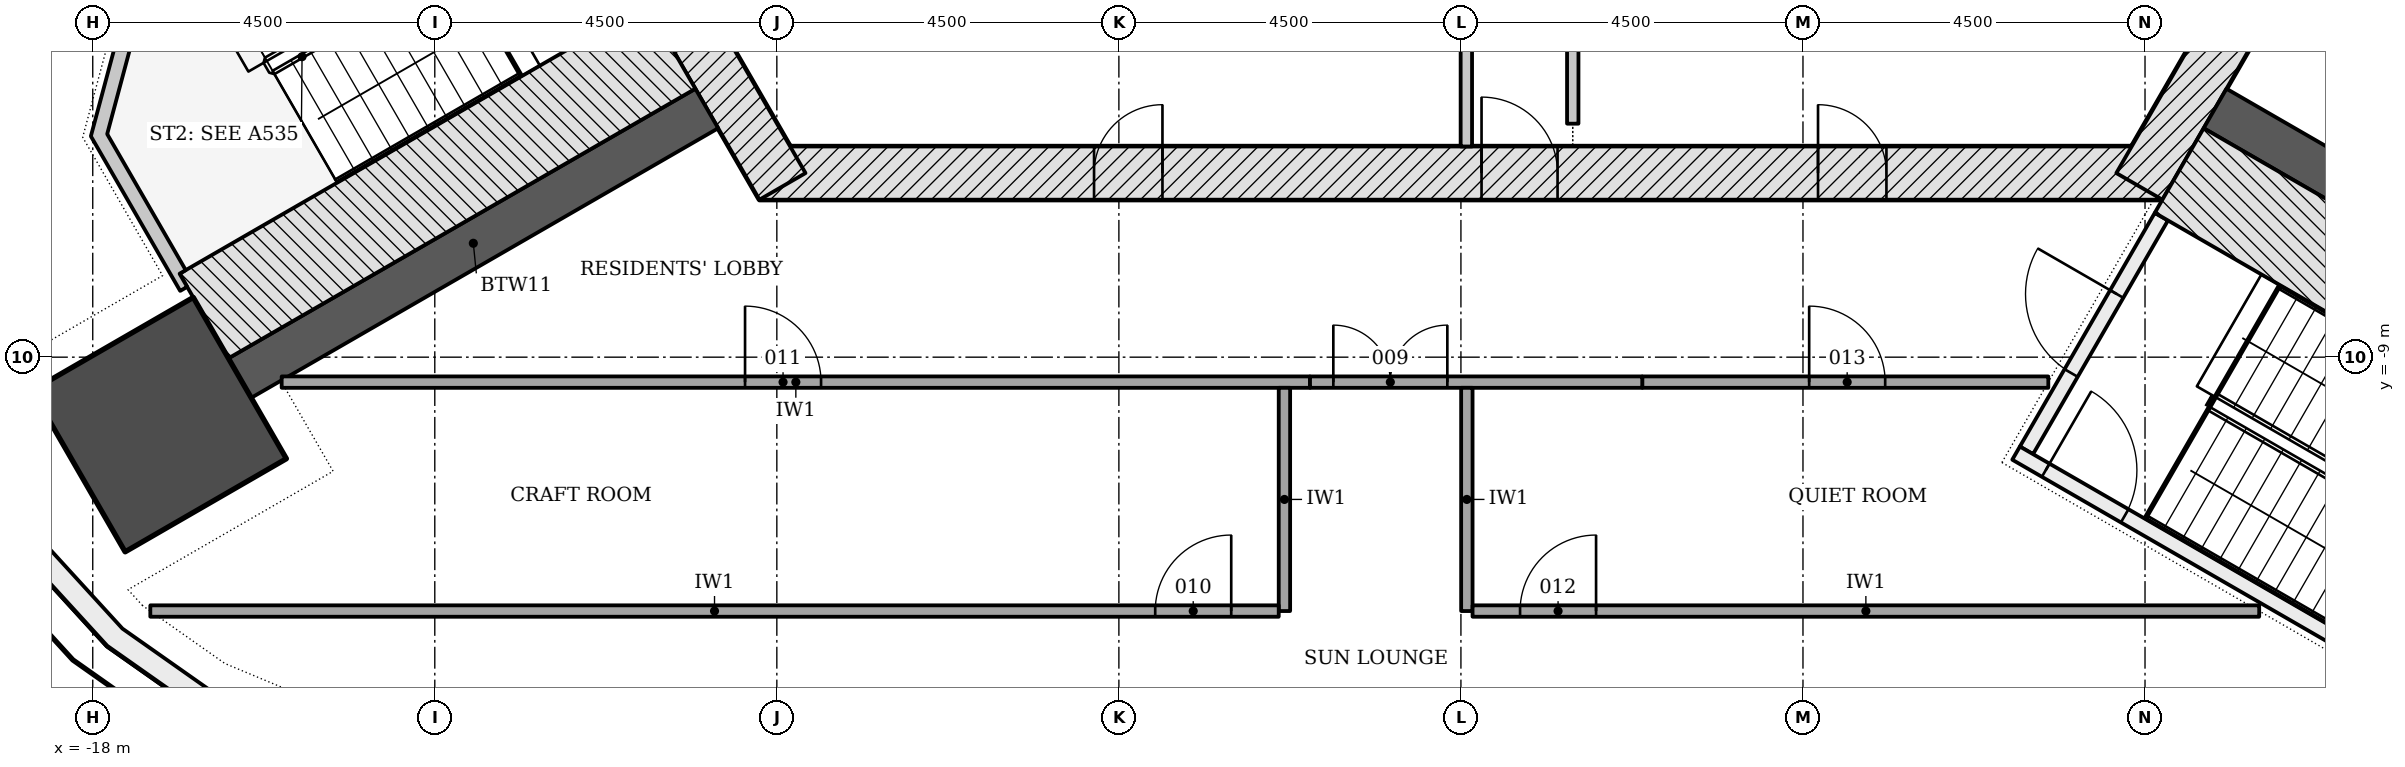
"""IFC4 building model, lengths in metres.
Left out: names, types, materials, properties, quantities, classifications, styles, units other than length and angle.
Written with IfcOpenShell. Run it as: python <this file> out.ifc"""

import sys

from ifc_helpers import new_model, si_unit, direction, frame, frame_2d, origin, origin_2d, place, context, subcontext, project, spatial, polyline, rectangle, outline, extrude, element, fill, save


model = new_model("IFC4")
c1 = context("Model", 3, precision=1e-05, world=origin(), true_north=direction((0.0, 1.0)))
c2 = subcontext(c1, "Body", "Model", "MODEL_VIEW")
j1 = project(units=[si_unit("LENGTHUNIT", "METRE"), si_unit("PLANEANGLEUNIT", "RADIAN")], contexts=[c1])
p1 = place(None, origin())
s1 = spatial("IfcSite", under=j1, at=p1, CompositionType="ELEMENT")
p2 = place(p1, origin())
s2 = spatial("IfcBuilding", under=s1, at=p2, CompositionType="ELEMENT")
p3 = place(p2, frame((0.0, 0.0, 240.0)))
s3 = spatial("IfcBuildingStorey", under=s2, at=p3, CompositionType="ELEMENT", Elevation=240.0)
p4 = place(p3, frame((-9.229, -6.578, -0.2), z_axis=(0.0, 0.0, 1.0), x_axis=(1.0, 0.0, 0.0)))
e1 = element("IfcWall", 1, at=p4, inside=s3, PredefinedType="SHEAR", context=c2, shape_type="SweptSolid", body=[
    extrude(rectangle(XDim=18.458, YDim=0.7, at=frame_2d((9.229, 0.0))), origin(), (0.0, 0.0, 1.0), 3.6),
])
p5 = place(p4, frame((9.5, 0.0, 0.2)))
e2 = element("IfcOpeningElement", 2, at=p5, cuts=e1, PredefinedType="OPENING", context=c2, shape_type="SweptSolid", body=[
    extrude(rectangle(XDim=1.0, YDim=2.1, at=frame_2d((0.5, 1.05))), frame((0.0, 0.36, 0.0), z_axis=(0.0, -1.0, 0.0), x_axis=(1.0, 0.0, 0.0)), (0.0, 0.0, 1.0), 0.72),
])
p6 = place(p4, frame((4.402, 0.0, 0.2)))
e3 = element("IfcOpeningElement", 3, at=p6, cuts=e1, PredefinedType="OPENING", context=c2, shape_type="SweptSolid", body=[
    extrude(rectangle(XDim=0.9, YDim=2.1, at=frame_2d((0.45, 1.05))), frame((0.0, 0.36, 0.0), z_axis=(0.0, -1.0, 0.0), x_axis=(1.0, 0.0, 0.0)), (0.0, 0.0, 1.0), 0.72),
])
p7 = place(p4, frame((13.927, 0.0, 0.2)))
e4 = element("IfcOpeningElement", 4, at=p7, cuts=e1, PredefinedType="OPENING", context=c2, shape_type="SweptSolid", body=[
    extrude(rectangle(XDim=0.9, YDim=2.1, at=frame_2d((0.45, 1.05))), frame((0.0, 0.36, 0.0), z_axis=(0.0, -1.0, 0.0), x_axis=(1.0, 0.0, 0.0)), (0.0, 0.0, 1.0), 0.72),
])
for number, where, z_axis, x_axis in (
    (5, (8.926, -6.753, -0.2), (0.0, 0.0, 1.0), (0.5, 0.866, 0.0)),
    (6, (-10.311, -4.353, -0.2), (0.0, 0.0, 1.0), (0.5, -0.866, 0.0)),
):
    element("IfcWall", number, at=place(p3, frame(where, z_axis=z_axis, x_axis=x_axis)), inside=s3, PredefinedType="SHEAR", context=c2, shape_type="SweptSolid", body=[
        extrude(rectangle(XDim=2.771, YDim=0.7, at=frame_2d((1.386, 0.0))), origin(), (0.0, 0.0, 1.0), 3.6),
    ])
for number, where, z_axis, x_axis in (
    (7, (-9.922, -5.728, -0.2), (0.0, 0.0, 1.0), (-0.866, -0.5, 0.0)),
    (8, (9.922, -5.728, -0.2), (0.0, 0.0, 1.0), (0.866, -0.5, 0.0)),
):
    element("IfcWall", number, at=place(p3, frame(where, z_axis=z_axis, x_axis=x_axis)), inside=s3, PredefinedType="SHEAR", context=c2, shape_type="SweptSolid", body=[
        extrude(rectangle(XDim=7.093, YDim=0.6, at=frame_2d((3.547, 0.0))), origin(), (0.0, 0.0, 1.0), 3.6),
    ])
p8 = place(p3, frame((-17.126, -9.887, -0.2), z_axis=(0.0, 0.0, 1.0), x_axis=(-0.866025403784, -0.5, 0.0)))
e9 = element("IfcColumn", 9, at=p8, inside=s3, PredefinedType="COLUMN", context=c2, shape_type="SweptSolid", body=[
    extrude(rectangle(XDim=2.45, YDim=2.45, at=origin_2d()), origin(), (0.0, 0.0, 1.0), 3.6),
])
p9 = place(p3, origin())
e10 = element("IfcWall", 10, at=p9, inside=s3, PredefinedType="NOTDEFINED", context=c2, shape_type="SweptSolid", body=[
    extrude(outline(polyline([(-18.301, -2.417), (-19.433, -4.702), (-19.931, -6.091), (-20.119, -7.555), (-19.987, -9.024), (-19.542, -10.431), (-18.804, -11.708), (-17.809, -12.798), (-16.602, -13.646), (-15.241, -14.215), (-13.789, -14.478), (-11.244, -14.641), (-11.225, -14.341), (-13.752, -14.18), (-15.155, -13.926), (-16.456, -13.382), (-17.609, -12.571), (-18.561, -11.53), (-19.266, -10.309), (-19.691, -8.965), (-19.817, -7.56), (-19.638, -6.162), (-19.156, -4.82), (-18.032, -2.55), (-18.301, -2.417)])), origin(), (0.0, 0.0, 1.0), 3.3),
])
p10 = place(p3, origin())
e11 = element("IfcWall", 11, at=p10, inside=s3, PredefinedType="NOTDEFINED", context=c2, shape_type="SweptSolid", body=[
    extrude(outline(polyline([(11.244, -14.641), (13.789, -14.478), (15.241, -14.215), (16.602, -13.646), (17.809, -12.798), (18.804, -11.708), (19.542, -10.431), (19.987, -9.024), (20.119, -7.555), (19.931, -6.091), (19.433, -4.702), (18.301, -2.417), (18.032, -2.55), (19.156, -4.82), (19.638, -6.162), (19.817, -7.56), (19.691, -8.965), (19.266, -10.309), (18.561, -11.53), (17.609, -12.571), (16.456, -13.382), (15.155, -13.926), (13.752, -14.18), (11.225, -14.341), (11.244, -14.641)])), origin(), (0.0, 0.0, 1.0), 3.3),
])
p11 = place(p3, frame((0.071, 4.272, 0.0), z_axis=(0.0, 0.0, 1.0), x_axis=(0.0, -1.0, 0.0)))
e12 = element("IfcWall", 12, at=p11, inside=s3, PredefinedType="PARTITIONING", context=c2, shape_type="SweptSolid", body=[
    extrude(rectangle(XDim=10.5, YDim=0.15, at=frame_2d((5.25, 0.0))), origin(), (0.0, 0.0, 1.0), 3.4),
])
p12 = place(p11, frame((3.101, 0.0, 0.0)))
e13 = element("IfcOpeningElement", 13, at=p12, cuts=e12, PredefinedType="OPENING", context=c2, shape_type="SweptSolid", body=[
    extrude(rectangle(XDim=0.9, YDim=2.1, at=frame_2d((0.45, 1.05))), frame((0.0, 0.085, 0.0), z_axis=(0.0, -1.0, 0.0), x_axis=(1.0, 0.0, 0.0)), (0.0, 0.0, 1.0), 0.17),
])
p13 = place(p3, frame((1.471, -5.928, 0.0), z_axis=(0.0, 0.0, 1.0), x_axis=(0.0, 1.0, 0.0)))
e14 = element("IfcWall", 14, at=p13, inside=s3, PredefinedType="PARTITIONING", context=c2, shape_type="SweptSolid", body=[
    extrude(rectangle(XDim=10.206, YDim=0.15, at=frame_2d((5.103, 0.0))), origin(), (0.0, 0.0, 1.0), 3.4),
])
p14 = place(p13, frame((6.15, 0.0, 0.0)))
e15 = element("IfcOpeningElement", 15, at=p14, cuts=e14, PredefinedType="OPENING", context=c2, shape_type="SweptSolid", body=[
    extrude(rectangle(XDim=1.0, YDim=2.1, at=frame_2d((0.5, 1.05))), frame((0.0, 0.085, 0.0), z_axis=(0.0, -1.0, 0.0), x_axis=(1.0, 0.0, 0.0)), (0.0, 0.0, 1.0), 0.17),
])
p15 = place(p3, frame((-10.393, -4.912, -0.2), z_axis=(0.0, 0.0, 1.0), x_axis=(-0.866023389271, -0.500003489223, 0.0)))
e16 = element("IfcWall", 16, at=p15, inside=s3, PredefinedType="SHEAR", context=c2, shape_type="SweptSolid", body=[
    extrude(rectangle(XDim=7.094, YDim=1.286, at=frame_2d((3.547, 0.0))), origin(), (0.0, 0.0, 1.0), 3.6),
])
p16 = place(p3, frame((0.0, 0.0, -0.2)))
e17 = element("IfcWall", 17, at=p16, inside=s3, PredefinedType="SHEAR", context=c2, shape_type="SweptSolid", body=[
    extrude(outline(polyline([(-17.439, -3.907), (-18.025, -6.093), (-16.85, -8.128), (-16.758, -8.075), (-16.858, -7.902), (-16.858, -7.902), (-16.858, -7.902), (-16.858, -7.902), (-16.858, -7.902), (-16.858, -7.902), (-16.858, -7.902), (-16.858, -7.902), (-16.858, -7.902), (-16.858, -7.902), (-16.858, -7.902), (-16.858, -7.902), (-16.858, -7.902), (-16.858, -7.902), (-16.858, -7.902), (-16.858, -7.902), (-16.858, -7.902), (-16.777, -7.855), (-17.81, -6.065), (-17.267, -4.039), (-17.339, -4.081), (-17.339, -4.081), (-17.339, -4.081), (-17.339, -4.081), (-17.339, -4.081), (-17.339, -4.081), (-17.339, -4.081), (-17.339, -4.081), (-17.339, -4.081), (-17.339, -4.081), (-17.339, -4.081), (-17.339, -4.081), (-17.339, -4.081), (-17.339, -4.081), (-17.339, -4.081), (-17.339, -4.081), (-17.339, -4.081), (-17.439, -3.907)])), origin(), (0.0, 0.0, 1.0), 3.6),
])
p17 = place(p3, frame((7.44, -10.226, -0.2), z_axis=(0.0, 0.0, 1.0), x_axis=(0.500022077904, 0.866012656725, 0.0)))
e18 = element("IfcWall", 18, at=p17, inside=s3, PredefinedType="SHEAR", context=c2, shape_type="SweptSolid", body=[
    extrude(rectangle(XDim=3.55, YDim=0.2, at=frame_2d((1.775, 0.0))), origin(), (0.0, 0.0, 1.0), 3.6),
])
p18 = place(p17, frame((1.175, 0.0, 0.2)))
e19 = element("IfcOpeningElement", 19, at=p18, cuts=e18, PredefinedType="OPENING", context=c2, shape_type="SweptSolid", body=[
    extrude(rectangle(XDim=1.2, YDim=2.1, at=frame_2d((0.6, 1.05))), frame((0.0, 0.11, 0.0), z_axis=(0.0, -1.0, 0.0), x_axis=(1.0, 0.0, 0.0)), (0.0, 0.0, 1.0), 0.22),
])
p19 = place(p3, frame((7.304, -10.262, -0.2), z_axis=(0.0, 0.0, 1.0), x_axis=(0.866026594901, -0.49999793692, 0.0)))
e20 = element("IfcWall", 20, at=p19, inside=s3, PredefinedType="SHEAR", context=c2, shape_type="SweptSolid", body=[
    extrude(rectangle(XDim=5.6, YDim=0.2, at=frame_2d((2.8, 0.0))), origin(), (0.0, 0.0, 1.0), 3.6),
])
p20 = place(p19, frame((0.45, 0.0, 0.2)))
e21 = element("IfcOpeningElement", 21, at=p20, cuts=e20, PredefinedType="OPENING", context=c2, shape_type="SweptSolid", body=[
    extrude(rectangle(XDim=1.2, YDim=2.1, at=frame_2d((0.6, 1.05))), frame((0.0, 0.11, 0.0), z_axis=(0.0, -1.0, 0.0), x_axis=(1.0, 0.0, 0.0)), (0.0, 0.0, 1.0), 0.22),
])
p21 = place(p3, frame((9.45, -6.545, -0.2), z_axis=(0.0, 0.0, 1.0), x_axis=(0.866023389271, -0.500003489223, 0.0)))
e22 = element("IfcWall", 22, at=p21, inside=s3, PredefinedType="SHEAR", context=c2, shape_type="SweptSolid", body=[
    extrude(rectangle(XDim=7.094, YDim=1.286, at=frame_2d((3.547, 0.0))), origin(), (0.0, 0.0, 1.0), 3.6),
])
p22 = place(p3, frame((15.836, -8.772, 0.0), z_axis=(0.0, 0.0, 1.0), x_axis=(-0.500001479768, 0.866024549438, 0.0)))
e23 = element("IfcWall", 23, at=p22, inside=s3, PredefinedType="PARTITIONING", context=c2, shape_type="SweptSolid", body=[
    extrude(rectangle(XDim=17.9, YDim=0.15, at=frame_2d((8.95, 0.0))), origin(), (0.0, 0.0, 1.0), 2.852),
])
p23 = place(p22, frame((2.973, 0.0, 0.0)))
e24 = element("IfcOpeningElement", 24, at=p23, cuts=e23, PredefinedType="OPENING", context=c2, shape_type="SweptSolid", body=[
    extrude(rectangle(XDim=1.0, YDim=2.1, at=frame_2d((0.5, 1.05))), frame((0.0, 0.085, 0.0), z_axis=(0.0, -1.0, 0.0), x_axis=(1.0, 0.0, 0.0)), (0.0, 0.0, 1.0), 0.17),
])
p24 = place(p22, frame((11.837, 0.0, 0.0)))
e25 = element("IfcOpeningElement", 25, at=p24, cuts=e23, PredefinedType="OPENING", context=c2, shape_type="SweptSolid", body=[
    extrude(rectangle(XDim=1.0, YDim=2.1, at=frame_2d((0.5, 1.05))), frame((0.0, 0.085, 0.0), z_axis=(0.0, -1.0, 0.0), x_axis=(1.0, 0.0, 0.0)), (0.0, 0.0, 1.0), 0.17),
])
p25 = place(p3, frame((-15.514, -9.328, 0.0), z_axis=(0.0, 0.0, 1.0), x_axis=(1.0, 0.0, 0.0)))
e26 = element("IfcWall", 26, at=p25, inside=s3, PredefinedType="PARTITIONING", context=c2, shape_type="SweptSolid", body=[
    extrude(rectangle(XDim=13.529, YDim=0.15, at=frame_2d((6.764, 0.0))), origin(), (0.0, 0.0, 1.0), 2.852),
])
p26 = place(p25, frame((6.096, 0.0, 0.0)))
e27 = element("IfcOpeningElement", 27, at=p26, cuts=e26, PredefinedType="OPENING", context=c2, shape_type="SweptSolid", body=[
    extrude(rectangle(XDim=1.0, YDim=2.1, at=frame_2d((0.5, 1.05))), frame((0.0, 0.085, 0.0), z_axis=(0.0, -1.0, 0.0), x_axis=(1.0, 0.0, 0.0)), (0.0, 0.0, 1.0), 0.17),
])
p27 = place(p3, frame((2.385, -9.328, 0.0), z_axis=(0.0, 0.0, 1.0), x_axis=(1.0, 0.0, 0.0)))
e28 = element("IfcWall", 28, at=p27, inside=s3, PredefinedType="PARTITIONING", context=c2, shape_type="SweptSolid", body=[
    extrude(rectangle(XDim=5.342, YDim=0.15, at=frame_2d((2.671, 0.0))), origin(), (0.0, 0.0, 1.0), 2.852),
])
p28 = place(p27, frame((2.196, 0.0, 0.0)))
e29 = element("IfcOpeningElement", 29, at=p28, cuts=e28, PredefinedType="OPENING", context=c2, shape_type="SweptSolid", body=[
    extrude(rectangle(XDim=1.0, YDim=2.1, at=frame_2d((0.5, 1.05))), frame((0.0, 0.085, 0.0), z_axis=(0.0, -1.0, 0.0), x_axis=(1.0, 0.0, 0.0)), (0.0, 0.0, 1.0), 0.17),
])
p29 = place(p3, frame((-1.986, -9.328, 0.0), z_axis=(0.0, 0.0, 1.0), x_axis=(1.0, 0.0, 0.0)))
e30 = element("IfcWall", 30, at=p29, inside=s3, PredefinedType="PARTITIONING", context=c2, shape_type="SweptSolid", body=[
    extrude(rectangle(XDim=4.371, YDim=0.15, at=frame_2d((2.186, 0.0))), origin(), (0.0, 0.0, 1.0), 2.852),
])
p30 = place(p29, frame((0.307, 0.0, 0.0)))
e31 = element("IfcOpeningElement", 31, at=p30, cuts=e30, PredefinedType="OPENING", context=c2, shape_type="SweptSolid", body=[
    extrude(rectangle(XDim=1.5, YDim=2.1, at=frame_2d((0.75, 1.05))), frame((0.0, 0.085, 0.0), z_axis=(0.0, -1.0, 0.0), x_axis=(1.0, 0.0, 0.0)), (0.0, 0.0, 1.0), 0.17),
])
p31 = place(p3, frame((-2.322, -9.403, 0.0), z_axis=(0.0, 0.0, 1.0), x_axis=(0.0, -1.0, 0.0)))
e32 = element("IfcWall", 32, at=p31, inside=s3, PredefinedType="PARTITIONING", context=c2, shape_type="SweptSolid", body=[
    extrude(rectangle(XDim=2.937, YDim=0.15, at=frame_2d((1.468, 0.0))), origin(), (0.0, 0.0, 1.0), 2.852),
])
p32 = place(p3, frame((0.078, -9.403, 0.0), z_axis=(0.0, 0.0, 1.0), x_axis=(0.0, -1.0, 0.0)))
e33 = element("IfcWall", 33, at=p32, inside=s3, PredefinedType="PARTITIONING", context=c2, shape_type="SweptSolid", body=[
    extrude(rectangle(XDim=2.937, YDim=0.15, at=frame_2d((1.468, 0.0))), origin(), (0.0, 0.0, 1.0), 3.4),
])
p33 = place(p3, frame((-17.243, -12.34, 0.0), z_axis=(0.0, 0.0, 1.0), x_axis=(1.0, 0.0, 0.0)))
e34 = element("IfcWall", 34, at=p33, inside=s3, PredefinedType="PARTITIONING", context=c2, shape_type="SweptSolid", body=[
    extrude(rectangle(XDim=14.846, YDim=0.15, at=frame_2d((7.423, 0.0))), origin(), (0.0, 0.0, 1.0), 2.852),
])
p34 = place(p33, frame((13.221, 0.0, 0.0)))
e35 = element("IfcOpeningElement", 35, at=p34, cuts=e34, PredefinedType="OPENING", context=c2, shape_type="SweptSolid", body=[
    extrude(rectangle(XDim=1.0, YDim=2.1, at=frame_2d((0.5, 1.05))), frame((0.0, 0.085, 0.0), z_axis=(0.0, -1.0, 0.0), x_axis=(1.0, 0.0, 0.0)), (0.0, 0.0, 1.0), 0.17),
])
p35 = place(p3, frame((0.153, -12.34, 0.0), z_axis=(0.0, 0.0, 1.0), x_axis=(1.0, 0.0, 0.0)))
e36 = element("IfcWall", 36, at=p35, inside=s3, PredefinedType="PARTITIONING", context=c2, shape_type="SweptSolid", body=[
    extrude(rectangle(XDim=10.349, YDim=0.15, at=frame_2d((5.175, 0.0))), origin(), (0.0, 0.0, 1.0), 2.852),
])
p36 = place(p35, frame((0.625, 0.0, 0.0)))
e37 = element("IfcOpeningElement", 37, at=p36, cuts=e36, PredefinedType="OPENING", context=c2, shape_type="SweptSolid", body=[
    extrude(rectangle(XDim=1.0, YDim=2.1, at=frame_2d((0.5, 1.05))), frame((0.0, 0.085, 0.0), z_axis=(0.0, -1.0, 0.0), x_axis=(1.0, 0.0, 0.0)), (0.0, 0.0, 1.0), 0.17),
])
p37 = place(p5, origin())
e38 = element("IfcDoor", 38, at=p37, inside=s3, OperationType="SINGLE_SWING_LEFT", PredefinedType="DOOR", context=c2, shape_type="SweptSolid", body=[
    extrude(rectangle(XDim=1.0, YDim=2.1, at=frame_2d((0.5, 1.05))), frame((0.0, 0.075, 0.0), z_axis=(0.0, -1.0, 0.0), x_axis=(1.0, 0.0, 0.0)), (0.0, 0.0, 1.0), 0.15),
])
fill(e2, e38)
p38 = place(p6, origin())
e39 = element("IfcDoor", 39, at=p38, inside=s3, OperationType="SINGLE_SWING_RIGHT", PredefinedType="DOOR", context=c2, shape_type="SweptSolid", body=[
    extrude(rectangle(XDim=0.9, YDim=2.1, at=frame_2d((0.45, 1.05))), frame((0.0, 0.075, 0.0), z_axis=(0.0, -1.0, 0.0), x_axis=(1.0, 0.0, 0.0)), (0.0, 0.0, 1.0), 0.15),
])
fill(e3, e39)
p39 = place(p7, origin())
e40 = element("IfcDoor", 40, at=p39, inside=s3, OperationType="SINGLE_SWING_LEFT", PredefinedType="DOOR", context=c2, shape_type="SweptSolid", body=[
    extrude(rectangle(XDim=0.9, YDim=2.1, at=frame_2d((0.45, 1.05))), frame((0.0, 0.075, 0.0), z_axis=(0.0, -1.0, 0.0), x_axis=(1.0, 0.0, 0.0)), (0.0, 0.0, 1.0), 0.15),
])
fill(e4, e40)
p40 = place(p18, origin())
e41 = element("IfcDoor", 41, at=p40, inside=s3, OperationType="SINGLE_SWING_RIGHT", PredefinedType="DOOR", context=c2, shape_type="SweptSolid", body=[
    extrude(rectangle(XDim=1.2, YDim=2.1, at=frame_2d((0.6, 1.05))), frame((0.0, 0.025, 0.0), z_axis=(0.0, -1.0, 0.0), x_axis=(1.0, 0.0, 0.0)), (0.0, 0.0, 1.0), 0.05),
])
fill(e19, e41)
p41 = place(p20, origin())
e42 = element("IfcDoor", 42, at=p41, inside=s3, OperationType="SINGLE_SWING_LEFT", PredefinedType="DOOR", context=c2, shape_type="SweptSolid", body=[
    extrude(rectangle(XDim=1.2, YDim=2.1, at=frame_2d((0.6, 1.05))), frame((0.0, 0.025, 0.0), z_axis=(0.0, -1.0, 0.0), x_axis=(1.0, 0.0, 0.0)), (0.0, 0.0, 1.0), 0.05),
])
fill(e21, e42)
p42 = place(p30, origin())
e43 = element("IfcDoor", 43, at=p42, inside=s3, OperationType="DOUBLE_DOOR_SINGLE_SWING", PredefinedType="DOOR", context=c2, shape_type="SweptSolid", body=[
    extrude(rectangle(XDim=1.5, YDim=2.1, at=frame_2d((0.75, 1.05))), frame((0.0, 0.025, 0.0), z_axis=(0.0, -1.0, 0.0), x_axis=(1.0, 0.0, 0.0)), (0.0, 0.0, 1.0), 0.05),
])
fill(e31, e43)
p43 = place(p34, origin())
e44 = element("IfcDoor", 44, at=p43, inside=s3, OperationType="SINGLE_SWING_RIGHT", PredefinedType="DOOR", context=c2, shape_type="SweptSolid", body=[
    extrude(rectangle(XDim=1.0, YDim=2.1, at=frame_2d((0.5, 1.05))), frame((0.0, 0.025, 0.0), z_axis=(0.0, -1.0, 0.0), x_axis=(1.0, 0.0, 0.0)), (0.0, 0.0, 1.0), 0.05),
])
fill(e35, e44)
p44 = place(p26, origin())
e45 = element("IfcDoor", 45, at=p44, inside=s3, OperationType="SINGLE_SWING_LEFT", PredefinedType="DOOR", context=c2, shape_type="SweptSolid", body=[
    extrude(rectangle(XDim=1.0, YDim=2.1, at=frame_2d((0.5, 1.05))), frame((0.0, 0.025, 0.0), z_axis=(0.0, -1.0, 0.0), x_axis=(1.0, 0.0, 0.0)), (0.0, 0.0, 1.0), 0.05),
])
fill(e27, e45)
p45 = place(p36, origin())
e46 = element("IfcDoor", 46, at=p45, inside=s3, OperationType="SINGLE_SWING_RIGHT", PredefinedType="DOOR", context=c2, shape_type="SweptSolid", body=[
    extrude(rectangle(XDim=1.0, YDim=2.1, at=frame_2d((0.5, 1.05))), frame((0.0, 0.025, 0.0), z_axis=(0.0, -1.0, 0.0), x_axis=(1.0, 0.0, 0.0)), (0.0, 0.0, 1.0), 0.05),
])
fill(e37, e46)
p46 = place(p28, origin())
e47 = element("IfcDoor", 47, at=p46, inside=s3, OperationType="SINGLE_SWING_LEFT", PredefinedType="DOOR", context=c2, shape_type="SweptSolid", body=[
    extrude(rectangle(XDim=1.0, YDim=2.1, at=frame_2d((0.5, 1.05))), frame((0.0, 0.025, 0.0), z_axis=(0.0, -1.0, 0.0), x_axis=(1.0, 0.0, 0.0)), (0.0, 0.0, 1.0), 0.05),
])
fill(e29, e47)
save(model, sys.argv[1])
